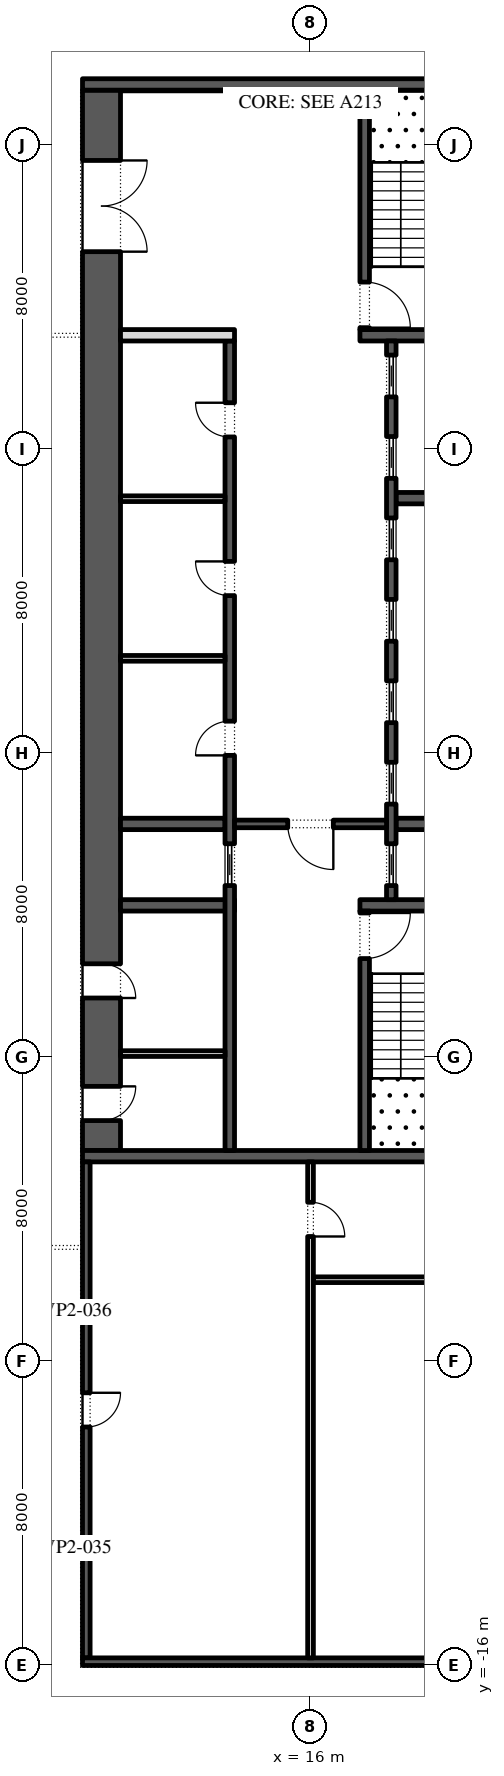
"""IFC4 building model, lengths in metres.
Left out: names, types, materials, properties, quantities, classifications, styles, units other than length and angle.
Written with IfcOpenShell. Run it as: python <this file> out.ifc"""

import sys

from ifc_helpers import new_model, si_unit, direction, frame, frame_2d, origin, place, context, subcontext, project, spatial, rectangle, extrude, element, fill, save


model = new_model("IFC4")
c1 = context("Model", 3, precision=1e-05, world=origin(), true_north=direction((0.0, 1.0)))
c2 = subcontext(c1, "Body", "Model", "MODEL_VIEW")
j1 = project(units=[si_unit("LENGTHUNIT", "METRE"), si_unit("PLANEANGLEUNIT", "RADIAN")], contexts=[c1])
p1 = place(None, origin())
s1 = spatial("IfcSite", under=j1, at=p1, CompositionType="ELEMENT")
p2 = place(p1, origin())
s2 = spatial("IfcBuilding", under=s1, at=p2, CompositionType="ELEMENT")
p3 = place(p2, frame((0.0, 0.0, 52.2)))
s3 = spatial("IfcBuildingStorey", under=s2, at=p3, CompositionType="ELEMENT", Elevation=52.2)
p4 = place(p3, frame((10.5, -2.45, 0.0), z_axis=(0.0, 0.0, 1.0), x_axis=(0.0, 1.0, 0.0)))
e1 = element("IfcWall", 1, at=p4, inside=s3, PredefinedType="SHEAR", context=c2, shape_type="SweptSolid", body=[
    extrude(rectangle(XDim=27.9, YDim=1.0, at=frame_2d((13.95, 0.0))), origin(), (0.0, 0.0, 1.0), 4.0),
])
p5 = place(p4, frame((23.65, 0.0, 0.0)))
e2 = element("IfcOpeningElement", 2, at=p5, cuts=e1, PredefinedType="OPENING", context=c2, shape_type="SweptSolid", body=[
    extrude(rectangle(XDim=2.4, YDim=2.1, at=frame_2d((1.2, 1.05))), frame((0.0, 0.51, 0.0), z_axis=(0.0, -1.0, 0.0), x_axis=(1.0, 0.0, 0.0)), (0.0, 0.0, 1.0), 1.02),
])
p6 = place(p4, frame((0.788, 0.0, 0.0)))
e3 = element("IfcOpeningElement", 3, at=p6, cuts=e1, PredefinedType="OPENING", context=c2, shape_type="SweptSolid", body=[
    extrude(rectangle(XDim=0.9, YDim=2.1, at=frame_2d((0.45, 1.05))), frame((0.0, 0.51, 0.0), z_axis=(0.0, -1.0, 0.0), x_axis=(1.0, 0.0, 0.0)), (0.0, 0.0, 1.0), 1.02),
])
p7 = place(p4, frame((4.012, 0.0, 0.0)))
e4 = element("IfcOpeningElement", 4, at=p7, cuts=e1, PredefinedType="OPENING", context=c2, shape_type="SweptSolid", body=[
    extrude(rectangle(XDim=0.9, YDim=2.1, at=frame_2d((0.45, 1.05))), frame((0.0, 0.51, 0.0), z_axis=(0.0, -1.0, 0.0), x_axis=(1.0, 0.0, 0.0)), (0.0, 0.0, 1.0), 1.02),
])
for number, where, z_axis, x_axis in (
    (5, (10.0, -2.6, 0.0), (0.0, 0.0, 1.0), (1.0, 0.0, 0.0)),
    (6, (10.0, 25.6, 0.0), (0.0, 0.0, 1.0), (1.0, 0.0, 0.0)),
):
    element("IfcWall", number, at=place(p3, frame(where, z_axis=z_axis, x_axis=x_axis)), inside=s3, PredefinedType="SHEAR", context=c2, shape_type="SweptSolid", body=[
        extrude(rectangle(XDim=12.0, YDim=0.3, at=frame_2d((6.0, 0.0))), origin(), (0.0, 0.0, 1.0), 4.0),
    ])
p8 = place(p3, frame((17.3, 4.0, 0.0), z_axis=(0.0, 0.0, 1.0), x_axis=(1.0, 0.0, 0.0)))
e7 = element("IfcWall", 7, at=p8, inside=s3, PredefinedType="SHEAR", context=c2, shape_type="SweptSolid", body=[
    extrude(rectangle(XDim=3.7, YDim=0.3, at=frame_2d((1.85, 0.0))), origin(), (0.0, 0.0, 1.0), 4.0),
])
p9 = place(p3, frame((17.425, -2.45, 0.0), z_axis=(0.0, 0.0, 1.0), x_axis=(0.0, 1.0, 0.0)))
e8 = element("IfcWall", 8, at=p9, inside=s3, PredefinedType="SHEAR", context=c2, shape_type="SweptSolid", body=[
    extrude(rectangle(XDim=6.3, YDim=0.25, at=frame_2d((3.15, 0.0))), origin(), (0.0, 0.0, 1.0), 4.0),
])
p10 = place(p9, frame((5.05, 0.0, 0.0)))
e9 = element("IfcOpeningElement", 9, at=p10, cuts=e8, PredefinedType="OPENING", context=c2, shape_type="SweptSolid", body=[
    extrude(rectangle(XDim=1.2, YDim=2.1, at=frame_2d((0.6, 1.05))), frame((0.0, 0.135, 0.0), z_axis=(0.0, -1.0, 0.0), x_axis=(1.0, 0.0, 0.0)), (0.0, 0.0, 1.0), 0.27),
])
p11 = place(p3, frame((17.3, 19.0, 0.0), z_axis=(0.0, 0.0, 1.0), x_axis=(1.0, 0.0, 0.0)))
e10 = element("IfcWall", 10, at=p11, inside=s3, PredefinedType="SHEAR", context=c2, shape_type="SweptSolid", body=[
    extrude(rectangle(XDim=3.7, YDim=0.3, at=frame_2d((1.85, 0.0))), origin(), (0.0, 0.0, 1.0), 4.0),
])
p12 = place(p3, frame((17.425, 19.15, 0.0), z_axis=(0.0, 0.0, 1.0), x_axis=(0.0, 1.0, 0.0)))
e11 = element("IfcWall", 11, at=p12, inside=s3, PredefinedType="SHEAR", context=c2, shape_type="SweptSolid", body=[
    extrude(rectangle(XDim=6.3, YDim=0.25, at=frame_2d((3.15, 0.0))), origin(), (0.0, 0.0, 1.0), 4.0),
])
p13 = place(p12, frame((0.05, 0.0, 0.0)))
e12 = element("IfcOpeningElement", 12, at=p13, cuts=e11, PredefinedType="OPENING", context=c2, shape_type="SweptSolid", body=[
    extrude(rectangle(XDim=1.2, YDim=2.1, at=frame_2d((0.6, 1.05))), frame((0.0, 0.135, 0.0), z_axis=(0.0, -1.0, 0.0), x_axis=(1.0, 0.0, 0.0)), (0.0, 0.0, 1.0), 0.27),
])
for number, where, z_axis, x_axis in (
    (13, (18.25, 6.143, 0.0), (0.0, 0.0, 1.0), (1.0, 0.0, 0.0)),
    (14, (18.25, 14.714, 0.0), (0.0, 0.0, 1.0), (1.0, 0.0, 0.0)),
):
    element("IfcWall", number, at=place(p3, frame(where, z_axis=z_axis, x_axis=x_axis)), inside=s3, PredefinedType="SHEAR", context=c2, shape_type="SweptSolid", body=[
        extrude(rectangle(XDim=2.75, YDim=0.3, at=frame_2d((1.375, 0.0))), origin(), (0.0, 0.0, 1.0), 4.0),
    ])
p14 = place(p3, frame((18.125, 4.15, 0.0), z_axis=(0.0, 0.0, 1.0), x_axis=(0.0, 1.0, 0.0)))
e15 = element("IfcWall", 15, at=p14, inside=s3, PredefinedType="SHEAR", context=c2, shape_type="SweptSolid", body=[
    extrude(rectangle(XDim=14.7, YDim=0.25, at=frame_2d((7.35, 0.0))), origin(), (0.0, 0.0, 1.0), 4.0),
])
p15 = place(p14, frame((0.371, 0.0, 0.0)))
e16 = element("IfcOpeningElement", 16, at=p15, cuts=e15, PredefinedType="OPENING", context=c2, shape_type="SweptSolid", body=[
    extrude(rectangle(XDim=1.1, YDim=2.1, at=frame_2d((0.55, 1.05))), frame((0.0, 0.135, 0.0), z_axis=(0.0, -1.0, 0.0), x_axis=(1.0, 0.0, 0.0)), (0.0, 0.0, 1.0), 0.27),
])
p16 = place(p14, frame((2.514, 0.0, 0.0)))
e17 = element("IfcOpeningElement", 17, at=p16, cuts=e15, PredefinedType="OPENING", context=c2, shape_type="SweptSolid", body=[
    extrude(rectangle(XDim=1.1, YDim=2.1, at=frame_2d((0.55, 1.05))), frame((0.0, 0.135, 0.0), z_axis=(0.0, -1.0, 0.0), x_axis=(1.0, 0.0, 0.0)), (0.0, 0.0, 1.0), 0.27),
])
p17 = place(p14, frame((4.657, 0.0, 0.0)))
e18 = element("IfcOpeningElement", 18, at=p17, cuts=e15, PredefinedType="OPENING", context=c2, shape_type="SweptSolid", body=[
    extrude(rectangle(XDim=1.1, YDim=2.1, at=frame_2d((0.55, 1.05))), frame((0.0, 0.135, 0.0), z_axis=(0.0, -1.0, 0.0), x_axis=(1.0, 0.0, 0.0)), (0.0, 0.0, 1.0), 0.27),
])
p18 = place(p14, frame((6.8, 0.0, 0.0)))
e19 = element("IfcOpeningElement", 19, at=p18, cuts=e15, PredefinedType="OPENING", context=c2, shape_type="SweptSolid", body=[
    extrude(rectangle(XDim=1.1, YDim=2.1, at=frame_2d((0.55, 1.05))), frame((0.0, 0.135, 0.0), z_axis=(0.0, -1.0, 0.0), x_axis=(1.0, 0.0, 0.0)), (0.0, 0.0, 1.0), 0.27),
])
p19 = place(p14, frame((8.943, 0.0, 0.0)))
e20 = element("IfcOpeningElement", 20, at=p19, cuts=e15, PredefinedType="OPENING", context=c2, shape_type="SweptSolid", body=[
    extrude(rectangle(XDim=1.1, YDim=2.1, at=frame_2d((0.55, 1.05))), frame((0.0, 0.135, 0.0), z_axis=(0.0, -1.0, 0.0), x_axis=(1.0, 0.0, 0.0)), (0.0, 0.0, 1.0), 0.27),
])
p20 = place(p14, frame((11.086, 0.0, 0.0)))
e21 = element("IfcOpeningElement", 21, at=p20, cuts=e15, PredefinedType="OPENING", context=c2, shape_type="SweptSolid", body=[
    extrude(rectangle(XDim=1.1, YDim=2.1, at=frame_2d((0.55, 1.05))), frame((0.0, 0.135, 0.0), z_axis=(0.0, -1.0, 0.0), x_axis=(1.0, 0.0, 0.0)), (0.0, 0.0, 1.0), 0.27),
])
p21 = place(p14, frame((13.229, 0.0, 0.0)))
e22 = element("IfcOpeningElement", 22, at=p21, cuts=e15, PredefinedType="OPENING", context=c2, shape_type="SweptSolid", body=[
    extrude(rectangle(XDim=1.1, YDim=2.1, at=frame_2d((0.55, 1.05))), frame((0.0, 0.135, 0.0), z_axis=(0.0, -1.0, 0.0), x_axis=(1.0, 0.0, 0.0)), (0.0, 0.0, 1.0), 0.27),
])
p22 = place(p3, frame((11.0, 4.0, 0.0), z_axis=(0.0, 0.0, 1.0), x_axis=(1.0, 0.0, 0.0)))
e23 = element("IfcWall", 23, at=p22, inside=s3, PredefinedType="SHEAR", context=c2, shape_type="SweptSolid", body=[
    extrude(rectangle(XDim=3.0, YDim=0.3, at=frame_2d((1.5, 0.0))), origin(), (0.0, 0.0, 1.0), 4.0),
])
p23 = place(p3, frame((11.0, 6.143, 0.0), z_axis=(0.0, 0.0, 1.0), x_axis=(1.0, 0.0, 0.0)))
e24 = element("IfcWall", 24, at=p23, inside=s3, PredefinedType="SHEAR", context=c2, shape_type="SweptSolid", body=[
    extrude(rectangle(XDim=2.75, YDim=0.3, at=frame_2d((1.375, 0.0))), origin(), (0.0, 0.0, 1.0), 4.0),
])
p24 = place(p3, frame((13.875, -2.45, 0.0), z_axis=(0.0, 0.0, 1.0), x_axis=(0.0, 1.0, 0.0)))
e25 = element("IfcWall", 25, at=p24, inside=s3, PredefinedType="SHEAR", context=c2, shape_type="SweptSolid", body=[
    extrude(rectangle(XDim=21.3, YDim=0.25, at=frame_2d((10.65, 0.0))), origin(), (0.0, 0.0, 1.0), 4.0),
])
p25 = place(p24, frame((10.396, 0.0, 0.0)))
e26 = element("IfcOpeningElement", 26, at=p25, cuts=e25, PredefinedType="OPENING", context=c2, shape_type="SweptSolid", body=[
    extrude(rectangle(XDim=0.9, YDim=2.1, at=frame_2d((0.45, 1.05))), frame((0.0, 0.135, 0.0), z_axis=(0.0, -1.0, 0.0), x_axis=(1.0, 0.0, 0.0)), (0.0, 0.0, 1.0), 0.27),
])
p26 = place(p24, frame((14.6, 0.0, 0.0)))
e27 = element("IfcOpeningElement", 27, at=p26, cuts=e25, PredefinedType="OPENING", context=c2, shape_type="SweptSolid", body=[
    extrude(rectangle(XDim=0.9, YDim=2.1, at=frame_2d((0.45, 1.05))), frame((0.0, 0.135, 0.0), z_axis=(0.0, -1.0, 0.0), x_axis=(1.0, 0.0, 0.0)), (0.0, 0.0, 1.0), 0.27),
])
p27 = place(p24, frame((18.775, 0.0, 0.0)))
e28 = element("IfcOpeningElement", 28, at=p27, cuts=e25, PredefinedType="OPENING", context=c2, shape_type="SweptSolid", body=[
    extrude(rectangle(XDim=0.9, YDim=2.1, at=frame_2d((0.45, 1.05))), frame((0.0, 0.135, 0.0), z_axis=(0.0, -1.0, 0.0), x_axis=(1.0, 0.0, 0.0)), (0.0, 0.0, 1.0), 0.27),
])
p28 = place(p24, frame((6.971, 0.0, 0.0)))
e29 = element("IfcOpeningElement", 29, at=p28, cuts=e25, PredefinedType="OPENING", context=c2, shape_type="SweptSolid", body=[
    extrude(rectangle(XDim=1.1, YDim=2.1, at=frame_2d((0.55, 1.05))), frame((0.0, 0.135, 0.0), z_axis=(0.0, -1.0, 0.0), x_axis=(1.0, 0.0, 0.0)), (0.0, 0.0, 1.0), 0.27),
])
p29 = place(p3, frame((11.0, 19.0, 0.0), z_axis=(0.0, 0.0, 1.0), x_axis=(1.0, 0.0, 0.0)))
e30 = element("IfcWall", 30, at=p29, inside=s3, PredefinedType="PARTITIONING", context=c2, shape_type="SweptSolid", body=[
    extrude(rectangle(XDim=3.0, YDim=0.3, at=frame_2d((1.5, 0.0))), origin(), (0.0, 0.0, 1.0), 4.0),
])
for number, where, z_axis, x_axis in (
    (31, (11.0, 10.5, 0.0), (0.0, 0.0, 1.0), (1.0, 0.0, 0.0)),
    (32, (11.0, 14.7, 0.0), (0.0, 0.0, 1.0), (1.0, 0.0, 0.0)),
):
    element("IfcWall", number, at=place(p3, frame(where, z_axis=z_axis, x_axis=x_axis)), inside=s3, PredefinedType="PARTITIONING", context=c2, shape_type="SweptSolid", body=[
        extrude(rectangle(XDim=2.75, YDim=0.15, at=frame_2d((1.375, 0.0))), origin(), (0.0, 0.0, 1.0), 4.0),
    ])
p30 = place(p3, frame((14.0, 6.143, 0.0), z_axis=(0.0, 0.0, 1.0), x_axis=(1.0, 0.0, 0.0)))
e33 = element("IfcWall", 33, at=p30, inside=s3, PredefinedType="SHEAR", context=c2, shape_type="SweptSolid", body=[
    extrude(rectangle(XDim=4.0, YDim=0.2, at=frame_2d((2.0, 0.0))), origin(), (0.0, 0.0, 1.0), 4.0),
])
p31 = place(p30, frame((1.4, 0.0, 0.0)))
e34 = element("IfcOpeningElement", 34, at=p31, cuts=e33, PredefinedType="OPENING", context=c2, shape_type="SweptSolid", body=[
    extrude(rectangle(XDim=1.2, YDim=2.1, at=frame_2d((0.6, 1.05))), frame((0.0, 0.11, 0.0), z_axis=(0.0, -1.0, 0.0), x_axis=(1.0, 0.0, 0.0)), (0.0, 0.0, 1.0), 0.22),
])
p32 = place(p3, frame((11.0, 0.1, 0.0), z_axis=(0.0, 0.0, 1.0), x_axis=(1.0, 0.0, 0.0)))
e35 = element("IfcWall", 35, at=p32, inside=s3, PredefinedType="PARTITIONING", context=c2, shape_type="SweptSolid", body=[
    extrude(rectangle(XDim=2.75, YDim=0.15, at=frame_2d((1.375, 0.0))), origin(), (0.0, 0.0, 1.0), 4.0),
])
p33 = place(p3, frame((10.1, -15.8, 0.0), z_axis=(0.0, 0.0, 1.0), x_axis=(0.0, 1.0, 0.0)))
e36 = element("IfcWall", 36, at=p33, inside=s3, PredefinedType="SHEAR", context=c2, shape_type="SweptSolid", body=[
    extrude(rectangle(XDim=13.05, YDim=0.2, at=frame_2d((6.525, 0.0))), origin(), (0.0, 0.0, 1.0), 4.0),
])
p34 = place(p33, frame((6.075, 0.0, 0.0)))
e37 = element("IfcOpeningElement", 37, at=p34, cuts=e36, PredefinedType="OPENING", context=c2, shape_type="SweptSolid", body=[
    extrude(rectangle(XDim=0.9, YDim=2.1, at=frame_2d((0.45, 1.05))), frame((0.0, 0.11, 0.0), z_axis=(0.0, -1.0, 0.0), x_axis=(1.0, 0.0, 0.0)), (0.0, 0.0, 1.0), 0.22),
])
p35 = place(p3, frame((10.0, -15.9, 0.0), z_axis=(0.0, 0.0, 1.0), x_axis=(1.0, 0.0, 0.0)))
e38 = element("IfcWall", 38, at=p35, inside=s3, PredefinedType="SHEAR", context=c2, shape_type="SweptSolid", body=[
    extrude(rectangle(XDim=12.0, YDim=0.2, at=frame_2d((6.0, 0.0))), origin(), (0.0, 0.0, 1.0), 4.0),
])
p36 = place(p3, frame((16.0, -15.8, 0.0), z_axis=(0.0, 0.0, 1.0), x_axis=(0.0, 1.0, 0.0)))
e39 = element("IfcWall", 39, at=p36, inside=s3, PredefinedType="PARTITIONING", context=c2, shape_type="SweptSolid", body=[
    extrude(rectangle(XDim=13.05, YDim=0.15, at=frame_2d((6.525, 0.0))), origin(), (0.0, 0.0, 1.0), 4.0),
])
p37 = place(p36, frame((11.087, 0.0, 0.0)))
e40 = element("IfcOpeningElement", 40, at=p37, cuts=e39, PredefinedType="OPENING", context=c2, shape_type="SweptSolid", body=[
    extrude(rectangle(XDim=0.9, YDim=2.1, at=frame_2d((0.45, 1.05))), frame((0.0, 0.085, 0.0), z_axis=(0.0, -1.0, 0.0), x_axis=(1.0, 0.0, 0.0)), (0.0, 0.0, 1.0), 0.17),
])
p38 = place(p3, frame((16.075, -5.85, 0.0), z_axis=(0.0, 0.0, 1.0), x_axis=(1.0, 0.0, 0.0)))
e41 = element("IfcWall", 41, at=p38, inside=s3, PredefinedType="PARTITIONING", context=c2, shape_type="SweptSolid", body=[
    extrude(rectangle(XDim=5.725, YDim=0.15, at=frame_2d((2.863, 0.0))), origin(), (0.0, 0.0, 1.0), 4.0),
])
p39 = place(p15, origin())
e42 = element("IfcDoor", 42, at=p39, inside=s3, OperationType="SLIDING_TO_LEFT", PredefinedType="DOOR", context=c2, shape_type="SweptSolid", body=[
    extrude(rectangle(XDim=1.1, YDim=2.1, at=frame_2d((0.55, 1.05))), frame((0.0, 0.025, 0.0), z_axis=(0.0, -1.0, 0.0), x_axis=(1.0, 0.0, 0.0)), (0.0, 0.0, 1.0), 0.05),
])
fill(e16, e42)
p40 = place(p16, origin())
e43 = element("IfcDoor", 43, at=p40, inside=s3, OperationType="SLIDING_TO_LEFT", PredefinedType="DOOR", context=c2, shape_type="SweptSolid", body=[
    extrude(rectangle(XDim=1.1, YDim=2.1, at=frame_2d((0.55, 1.05))), frame((0.0, 0.025, 0.0), z_axis=(0.0, -1.0, 0.0), x_axis=(1.0, 0.0, 0.0)), (0.0, 0.0, 1.0), 0.05),
])
fill(e17, e43)
p41 = place(p17, origin())
e44 = element("IfcDoor", 44, at=p41, inside=s3, OperationType="SLIDING_TO_LEFT", PredefinedType="DOOR", context=c2, shape_type="SweptSolid", body=[
    extrude(rectangle(XDim=1.1, YDim=2.1, at=frame_2d((0.55, 1.05))), frame((0.0, 0.025, 0.0), z_axis=(0.0, -1.0, 0.0), x_axis=(1.0, 0.0, 0.0)), (0.0, 0.0, 1.0), 0.05),
])
fill(e18, e44)
p42 = place(p18, origin())
e45 = element("IfcDoor", 45, at=p42, inside=s3, OperationType="SLIDING_TO_LEFT", PredefinedType="DOOR", context=c2, shape_type="SweptSolid", body=[
    extrude(rectangle(XDim=1.1, YDim=2.1, at=frame_2d((0.55, 1.05))), frame((0.0, 0.025, 0.0), z_axis=(0.0, -1.0, 0.0), x_axis=(1.0, 0.0, 0.0)), (0.0, 0.0, 1.0), 0.05),
])
fill(e19, e45)
p43 = place(p19, origin())
e46 = element("IfcDoor", 46, at=p43, inside=s3, OperationType="SLIDING_TO_LEFT", PredefinedType="DOOR", context=c2, shape_type="SweptSolid", body=[
    extrude(rectangle(XDim=1.1, YDim=2.1, at=frame_2d((0.55, 1.05))), frame((0.0, 0.025, 0.0), z_axis=(0.0, -1.0, 0.0), x_axis=(1.0, 0.0, 0.0)), (0.0, 0.0, 1.0), 0.05),
])
fill(e20, e46)
p44 = place(p20, origin())
e47 = element("IfcDoor", 47, at=p44, inside=s3, OperationType="SLIDING_TO_LEFT", PredefinedType="DOOR", context=c2, shape_type="SweptSolid", body=[
    extrude(rectangle(XDim=1.1, YDim=2.1, at=frame_2d((0.55, 1.05))), frame((0.0, 0.025, 0.0), z_axis=(0.0, -1.0, 0.0), x_axis=(1.0, 0.0, 0.0)), (0.0, 0.0, 1.0), 0.05),
])
fill(e21, e47)
p45 = place(p21, origin())
e48 = element("IfcDoor", 48, at=p45, inside=s3, OperationType="SLIDING_TO_LEFT", PredefinedType="DOOR", context=c2, shape_type="SweptSolid", body=[
    extrude(rectangle(XDim=1.1, YDim=2.1, at=frame_2d((0.55, 1.05))), frame((0.0, 0.025, 0.0), z_axis=(0.0, -1.0, 0.0), x_axis=(1.0, 0.0, 0.0)), (0.0, 0.0, 1.0), 0.05),
])
fill(e22, e48)
p46 = place(p25, origin())
e49 = element("IfcDoor", 49, at=p46, inside=s3, OperationType="SINGLE_SWING_RIGHT", PredefinedType="DOOR", context=c2, shape_type="SweptSolid", body=[
    extrude(rectangle(XDim=0.9, YDim=2.1, at=frame_2d((0.45, 1.05))), frame((0.0, 0.125, 0.0), z_axis=(0.0, -1.0, 0.0), x_axis=(1.0, 0.0, 0.0)), (0.0, 0.0, 1.0), 0.05),
])
fill(e26, e49)
p47 = place(p26, origin())
e50 = element("IfcDoor", 50, at=p47, inside=s3, OperationType="SINGLE_SWING_LEFT", PredefinedType="DOOR", context=c2, shape_type="SweptSolid", body=[
    extrude(rectangle(XDim=0.9, YDim=2.1, at=frame_2d((0.45, 1.05))), frame((0.0, 0.125, 0.0), z_axis=(0.0, -1.0, 0.0), x_axis=(1.0, 0.0, 0.0)), (0.0, 0.0, 1.0), 0.05),
])
fill(e27, e50)
p48 = place(p27, origin())
e51 = element("IfcDoor", 51, at=p48, inside=s3, OperationType="SINGLE_SWING_LEFT", PredefinedType="DOOR", context=c2, shape_type="SweptSolid", body=[
    extrude(rectangle(XDim=0.9, YDim=2.1, at=frame_2d((0.45, 1.05))), frame((0.0, 0.125, 0.0), z_axis=(0.0, -1.0, 0.0), x_axis=(1.0, 0.0, 0.0)), (0.0, 0.0, 1.0), 0.05),
])
fill(e28, e51)
p49 = place(p28, origin())
e52 = element("IfcDoor", 52, at=p49, inside=s3, OperationType="SLIDING_TO_LEFT", PredefinedType="DOOR", context=c2, shape_type="SweptSolid", body=[
    extrude(rectangle(XDim=1.1, YDim=2.1, at=frame_2d((0.55, 1.05))), frame((0.0, 0.025, 0.0), z_axis=(0.0, -1.0, 0.0), x_axis=(1.0, 0.0, 0.0)), (0.0, 0.0, 1.0), 0.05),
])
fill(e29, e52)
p50 = place(p31, frame((1.2, 0.0, 0.0), z_axis=(0.0, 0.0, 1.0), x_axis=(-1.0, 0.0, 0.0)))
e53 = element("IfcDoor", 53, at=p50, inside=s3, OperationType="SINGLE_SWING_RIGHT", PredefinedType="DOOR", context=c2, shape_type="SweptSolid", body=[
    extrude(rectangle(XDim=1.2, YDim=2.1, at=frame_2d((0.6, 1.05))), frame((0.0, 0.025, 0.0), z_axis=(0.0, -1.0, 0.0), x_axis=(1.0, 0.0, 0.0)), (0.0, 0.0, 1.0), 0.05),
])
fill(e34, e53)
p51 = place(p5, frame((2.4, 0.0, 0.0), z_axis=(0.0, 0.0, 1.0), x_axis=(-1.0, 0.0, 0.0)))
e54 = element("IfcDoor", 54, at=p51, inside=s3, OperationType="DOUBLE_DOOR_SINGLE_SWING", PredefinedType="DOOR", context=c2, shape_type="SweptSolid", body=[
    extrude(rectangle(XDim=2.4, YDim=2.1, at=frame_2d((1.2, 1.05))), frame((0.0, 0.025, 0.0), z_axis=(0.0, -1.0, 0.0), x_axis=(1.0, 0.0, 0.0)), (0.0, 0.0, 1.0), 0.05),
])
fill(e2, e54)
p52 = place(p10, frame((1.2, 0.0, 0.0), z_axis=(0.0, 0.0, 1.0), x_axis=(-1.0, 0.0, 0.0)))
e55 = element("IfcDoor", 55, at=p52, inside=s3, OperationType="SINGLE_SWING_RIGHT", PredefinedType="DOOR", context=c2, shape_type="SweptSolid", body=[
    extrude(rectangle(XDim=1.2, YDim=2.1, at=frame_2d((0.6, 1.05))), frame((0.0, 0.025, 0.0), z_axis=(0.0, -1.0, 0.0), x_axis=(1.0, 0.0, 0.0)), (0.0, 0.0, 1.0), 0.05),
])
fill(e9, e55)
p53 = place(p13, frame((1.2, 0.0, 0.0), z_axis=(0.0, 0.0, 1.0), x_axis=(-1.0, 0.0, 0.0)))
e56 = element("IfcDoor", 56, at=p53, inside=s3, OperationType="SINGLE_SWING_LEFT", PredefinedType="DOOR", context=c2, shape_type="SweptSolid", body=[
    extrude(rectangle(XDim=1.2, YDim=2.1, at=frame_2d((0.6, 1.05))), frame((0.0, 0.025, 0.0), z_axis=(0.0, -1.0, 0.0), x_axis=(1.0, 0.0, 0.0)), (0.0, 0.0, 1.0), 0.05),
])
fill(e12, e56)
p54 = place(p6, frame((0.9, -0.95, 0.0), z_axis=(0.0, 0.0, 1.0), x_axis=(-1.0, 0.0, 0.0)))
e57 = element("IfcDoor", 57, at=p54, inside=s3, OperationType="SINGLE_SWING_RIGHT", PredefinedType="DOOR", context=c2, shape_type="SweptSolid", body=[
    extrude(rectangle(XDim=0.9, YDim=2.1, at=frame_2d((0.45, 1.05))), frame((0.0, -0.45, 0.0), z_axis=(0.0, -1.0, 0.0), x_axis=(1.0, 0.0, 0.0)), (0.0, 0.0, 1.0), 0.05),
])
fill(e3, e57)
p55 = place(p7, frame((0.9, -0.95, 0.0), z_axis=(0.0, 0.0, 1.0), x_axis=(-1.0, 0.0, 0.0)))
e58 = element("IfcDoor", 58, at=p55, inside=s3, OperationType="SINGLE_SWING_LEFT", PredefinedType="DOOR", context=c2, shape_type="SweptSolid", body=[
    extrude(rectangle(XDim=0.9, YDim=2.1, at=frame_2d((0.45, 1.05))), frame((0.0, -0.45, 0.0), z_axis=(0.0, -1.0, 0.0), x_axis=(1.0, 0.0, 0.0)), (0.0, 0.0, 1.0), 0.05),
])
fill(e4, e58)
p56 = place(p37, frame((0.9, 0.0, 0.0), z_axis=(0.0, 0.0, 1.0), x_axis=(-1.0, 0.0, 0.0)))
e59 = element("IfcDoor", 59, at=p56, inside=s3, OperationType="SINGLE_SWING_LEFT", PredefinedType="DOOR", context=c2, shape_type="SweptSolid", body=[
    extrude(rectangle(XDim=0.9, YDim=2.1, at=frame_2d((0.45, 1.05))), frame((0.0, 0.025, 0.0), z_axis=(0.0, -1.0, 0.0), x_axis=(1.0, 0.0, 0.0)), (0.0, 0.0, 1.0), 0.05),
])
fill(e40, e59)
p57 = place(p34, frame((0.9, -0.15, 0.0), z_axis=(0.0, 0.0, 1.0), x_axis=(-1.0, 0.0, 0.0)))
e60 = element("IfcDoor", 60, at=p57, inside=s3, OperationType="SINGLE_SWING_RIGHT", PredefinedType="DOOR", context=c2, shape_type="SweptSolid", body=[
    extrude(rectangle(XDim=0.9, YDim=2.1, at=frame_2d((0.45, 1.05))), frame((0.0, -0.05, 0.0), z_axis=(0.0, -1.0, 0.0), x_axis=(1.0, 0.0, 0.0)), (0.0, 0.0, 1.0), 0.05),
])
fill(e37, e60)
save(model, sys.argv[1])
